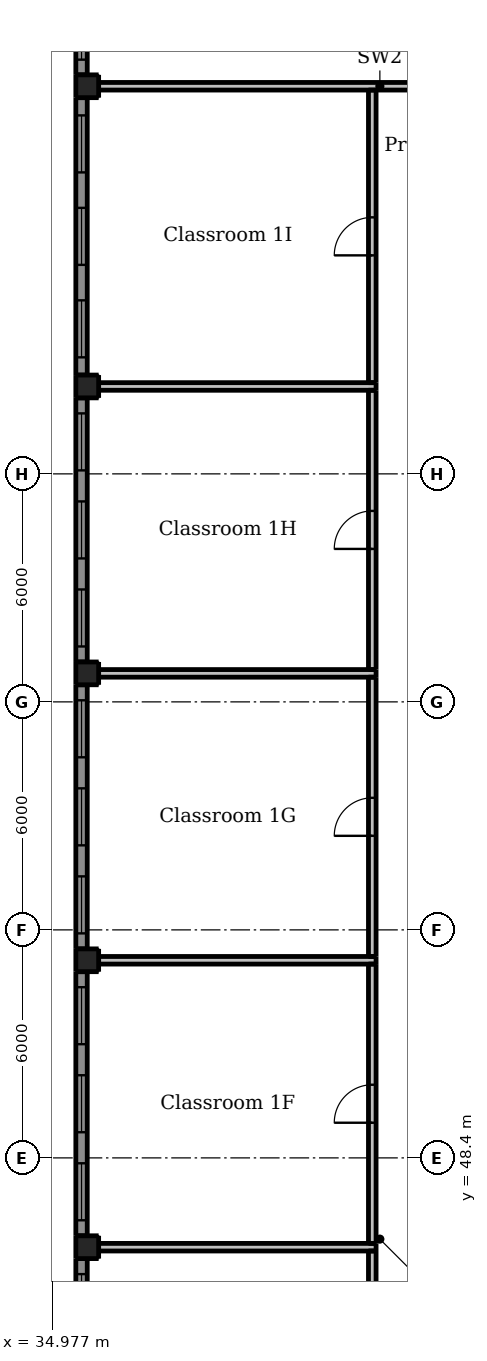
"""IFC4 building model, lengths in metres.
Left out: names, types, materials, properties, quantities, classifications, styles, units other than length and angle.
Written with IfcOpenShell. Run it as: python <this file> out.ifc"""

import sys

from ifc_helpers import new_model, si_unit, direction, frame, frame_2d, origin, origin_2d, place, context, subcontext, project, spatial, rectangle, extrude, element, fill, save


model = new_model("IFC4")
c1 = context("Model", 3, precision=1e-05, world=origin(), true_north=direction((0.0, 1.0)))
c2 = subcontext(c1, "Body", "Model", "MODEL_VIEW")
j1 = project(units=[si_unit("LENGTHUNIT", "METRE"), si_unit("PLANEANGLEUNIT", "RADIAN")], contexts=[c1])
p1 = place(None, origin())
s1 = spatial("IfcSite", under=j1, at=p1, CompositionType="ELEMENT")
p2 = place(p1, origin())
s2 = spatial("IfcBuilding", under=s1, at=p2, CompositionType="ELEMENT")
p3 = place(p2, frame((0.0, 0.0, 5.5)))
s3 = spatial("IfcBuildingStorey", under=s2, at=p3, CompositionType="ELEMENT", Elevation=5.5)
for number, where, z_axis, x_axis in (
    (1, (35.9, 46.05, -0.3), (0.0, 0.0, 1.0), (1.0, 0.0, 0.0)),
    (2, (35.9, 53.6, -0.3), (0.0, 0.0, 1.0), (1.0, 0.0, 0.0)),
    (3, (35.9, 61.15, -0.3), (0.0, 0.0, 1.0), (1.0, 0.0, 0.0)),
    (4, (35.9, 68.7, -0.3), (0.0, 0.0, 1.0), (1.0, 0.0, 0.0)),
    (5, (35.9, 76.6, -0.3), (0.0, 0.0, 1.0), (1.0, 0.0, 0.0)),
):
    element("IfcColumn", number, at=place(p3, frame(where, z_axis=z_axis, x_axis=x_axis)), inside=s3, PredefinedType="COLUMN", context=c2, shape_type="SweptSolid", body=[
        extrude(rectangle(XDim=0.6, YDim=0.6, at=origin_2d()), origin(), (0.0, 0.0, 1.0), 4.5),
    ])
p4 = place(p3, frame((35.75, 38.8, 0.0), z_axis=(0.0, 0.0, 1.0), x_axis=(0.0, 1.0, 0.0)))
e6 = element("IfcWall", 6, at=p4, inside=s3, PredefinedType="SOLIDWALL", context=c2, shape_type="SweptSolid", body=[
    extrude(rectangle(XDim=6.95, YDim=0.3, at=frame_2d((3.475, 0.0))), origin(), (0.0, 0.0, 1.0), 3.3),
])
p5 = place(p4, frame((0.408, 0.0, 0.9)))
e7 = element("IfcOpeningElement", 7, at=p5, cuts=e6, PredefinedType="OPENING", context=c2, shape_type="SweptSolid", body=[
    extrude(rectangle(XDim=1.5, YDim=1.5, at=frame_2d((0.75, 0.75))), frame((0.0, 0.16, 0.0), z_axis=(0.0, -1.0, 0.0), x_axis=(1.0, 0.0, 0.0)), (0.0, 0.0, 1.0), 0.32),
])
p6 = place(p4, frame((2.725, 0.0, 0.9)))
e8 = element("IfcOpeningElement", 8, at=p6, cuts=e6, PredefinedType="OPENING", context=c2, shape_type="SweptSolid", body=[
    extrude(rectangle(XDim=1.5, YDim=1.5, at=frame_2d((0.75, 0.75))), frame((0.0, 0.16, 0.0), z_axis=(0.0, -1.0, 0.0), x_axis=(1.0, 0.0, 0.0)), (0.0, 0.0, 1.0), 0.32),
])
p7 = place(p4, frame((5.042, 0.0, 0.9)))
e9 = element("IfcOpeningElement", 9, at=p7, cuts=e6, PredefinedType="OPENING", context=c2, shape_type="SweptSolid", body=[
    extrude(rectangle(XDim=1.5, YDim=1.5, at=frame_2d((0.75, 0.75))), frame((0.0, 0.16, 0.0), z_axis=(0.0, -1.0, 0.0), x_axis=(1.0, 0.0, 0.0)), (0.0, 0.0, 1.0), 0.32),
])
p8 = place(p3, frame((35.75, 46.35, 0.0), z_axis=(0.0, 0.0, 1.0), x_axis=(0.0, 1.0, 0.0)))
e10 = element("IfcWall", 10, at=p8, inside=s3, PredefinedType="SOLIDWALL", context=c2, shape_type="SweptSolid", body=[
    extrude(rectangle(XDim=6.95, YDim=0.3, at=frame_2d((3.475, 0.0))), origin(), (0.0, 0.0, 1.0), 3.3),
])
p9 = place(p8, frame((0.408, 0.0, 0.9)))
e11 = element("IfcOpeningElement", 11, at=p9, cuts=e10, PredefinedType="OPENING", context=c2, shape_type="SweptSolid", body=[
    extrude(rectangle(XDim=1.5, YDim=1.5, at=frame_2d((0.75, 0.75))), frame((0.0, 0.16, 0.0), z_axis=(0.0, -1.0, 0.0), x_axis=(1.0, 0.0, 0.0)), (0.0, 0.0, 1.0), 0.32),
])
p10 = place(p8, frame((2.725, 0.0, 0.9)))
e12 = element("IfcOpeningElement", 12, at=p10, cuts=e10, PredefinedType="OPENING", context=c2, shape_type="SweptSolid", body=[
    extrude(rectangle(XDim=1.5, YDim=1.5, at=frame_2d((0.75, 0.75))), frame((0.0, 0.16, 0.0), z_axis=(0.0, -1.0, 0.0), x_axis=(1.0, 0.0, 0.0)), (0.0, 0.0, 1.0), 0.32),
])
p11 = place(p8, frame((5.042, 0.0, 0.9)))
e13 = element("IfcOpeningElement", 13, at=p11, cuts=e10, PredefinedType="OPENING", context=c2, shape_type="SweptSolid", body=[
    extrude(rectangle(XDim=1.5, YDim=1.5, at=frame_2d((0.75, 0.75))), frame((0.0, 0.16, 0.0), z_axis=(0.0, -1.0, 0.0), x_axis=(1.0, 0.0, 0.0)), (0.0, 0.0, 1.0), 0.32),
])
p12 = place(p3, frame((35.75, 53.9, 0.0), z_axis=(0.0, 0.0, 1.0), x_axis=(0.0, 1.0, 0.0)))
e14 = element("IfcWall", 14, at=p12, inside=s3, PredefinedType="SOLIDWALL", context=c2, shape_type="SweptSolid", body=[
    extrude(rectangle(XDim=6.95, YDim=0.3, at=frame_2d((3.475, 0.0))), origin(), (0.0, 0.0, 1.0), 3.3),
])
p13 = place(p12, frame((0.408, 0.0, 0.9)))
e15 = element("IfcOpeningElement", 15, at=p13, cuts=e14, PredefinedType="OPENING", context=c2, shape_type="SweptSolid", body=[
    extrude(rectangle(XDim=1.5, YDim=1.5, at=frame_2d((0.75, 0.75))), frame((0.0, 0.16, 0.0), z_axis=(0.0, -1.0, 0.0), x_axis=(1.0, 0.0, 0.0)), (0.0, 0.0, 1.0), 0.32),
])
p14 = place(p12, frame((2.725, 0.0, 0.9)))
e16 = element("IfcOpeningElement", 16, at=p14, cuts=e14, PredefinedType="OPENING", context=c2, shape_type="SweptSolid", body=[
    extrude(rectangle(XDim=1.5, YDim=1.5, at=frame_2d((0.75, 0.75))), frame((0.0, 0.16, 0.0), z_axis=(0.0, -1.0, 0.0), x_axis=(1.0, 0.0, 0.0)), (0.0, 0.0, 1.0), 0.32),
])
p15 = place(p12, frame((5.042, 0.0, 0.9)))
e17 = element("IfcOpeningElement", 17, at=p15, cuts=e14, PredefinedType="OPENING", context=c2, shape_type="SweptSolid", body=[
    extrude(rectangle(XDim=1.5, YDim=1.5, at=frame_2d((0.75, 0.75))), frame((0.0, 0.16, 0.0), z_axis=(0.0, -1.0, 0.0), x_axis=(1.0, 0.0, 0.0)), (0.0, 0.0, 1.0), 0.32),
])
p16 = place(p3, frame((35.75, 61.45, 0.0), z_axis=(0.0, 0.0, 1.0), x_axis=(0.0, 1.0, 0.0)))
e18 = element("IfcWall", 18, at=p16, inside=s3, PredefinedType="SOLIDWALL", context=c2, shape_type="SweptSolid", body=[
    extrude(rectangle(XDim=6.95, YDim=0.3, at=frame_2d((3.475, 0.0))), origin(), (0.0, 0.0, 1.0), 3.3),
])
p17 = place(p16, frame((0.408, 0.0, 0.9)))
e19 = element("IfcOpeningElement", 19, at=p17, cuts=e18, PredefinedType="OPENING", context=c2, shape_type="SweptSolid", body=[
    extrude(rectangle(XDim=1.5, YDim=1.5, at=frame_2d((0.75, 0.75))), frame((0.0, 0.16, 0.0), z_axis=(0.0, -1.0, 0.0), x_axis=(1.0, 0.0, 0.0)), (0.0, 0.0, 1.0), 0.32),
])
p18 = place(p16, frame((2.725, 0.0, 0.9)))
e20 = element("IfcOpeningElement", 20, at=p18, cuts=e18, PredefinedType="OPENING", context=c2, shape_type="SweptSolid", body=[
    extrude(rectangle(XDim=1.5, YDim=1.5, at=frame_2d((0.75, 0.75))), frame((0.0, 0.16, 0.0), z_axis=(0.0, -1.0, 0.0), x_axis=(1.0, 0.0, 0.0)), (0.0, 0.0, 1.0), 0.32),
])
p19 = place(p16, frame((5.042, 0.0, 0.9)))
e21 = element("IfcOpeningElement", 21, at=p19, cuts=e18, PredefinedType="OPENING", context=c2, shape_type="SweptSolid", body=[
    extrude(rectangle(XDim=1.5, YDim=1.5, at=frame_2d((0.75, 0.75))), frame((0.0, 0.16, 0.0), z_axis=(0.0, -1.0, 0.0), x_axis=(1.0, 0.0, 0.0)), (0.0, 0.0, 1.0), 0.32),
])
p20 = place(p3, frame((35.75, 69.0, 0.0), z_axis=(0.0, 0.0, 1.0), x_axis=(0.0, 1.0, 0.0)))
e22 = element("IfcWall", 22, at=p20, inside=s3, PredefinedType="SOLIDWALL", context=c2, shape_type="SweptSolid", body=[
    extrude(rectangle(XDim=7.3, YDim=0.3, at=frame_2d((3.65, 0.0))), origin(), (0.0, 0.0, 1.0), 3.3),
])
p21 = place(p20, frame((0.467, 0.0, 0.9)))
e23 = element("IfcOpeningElement", 23, at=p21, cuts=e22, PredefinedType="OPENING", context=c2, shape_type="SweptSolid", body=[
    extrude(rectangle(XDim=1.5, YDim=1.5, at=frame_2d((0.75, 0.75))), frame((0.0, 0.16, 0.0), z_axis=(0.0, -1.0, 0.0), x_axis=(1.0, 0.0, 0.0)), (0.0, 0.0, 1.0), 0.32),
])
p22 = place(p20, frame((2.9, 0.0, 0.9)))
e24 = element("IfcOpeningElement", 24, at=p22, cuts=e22, PredefinedType="OPENING", context=c2, shape_type="SweptSolid", body=[
    extrude(rectangle(XDim=1.5, YDim=1.5, at=frame_2d((0.75, 0.75))), frame((0.0, 0.16, 0.0), z_axis=(0.0, -1.0, 0.0), x_axis=(1.0, 0.0, 0.0)), (0.0, 0.0, 1.0), 0.32),
])
p23 = place(p20, frame((5.333, 0.0, 0.9)))
e25 = element("IfcOpeningElement", 25, at=p23, cuts=e22, PredefinedType="OPENING", context=c2, shape_type="SweptSolid", body=[
    extrude(rectangle(XDim=1.5, YDim=1.5, at=frame_2d((0.75, 0.75))), frame((0.0, 0.16, 0.0), z_axis=(0.0, -1.0, 0.0), x_axis=(1.0, 0.0, 0.0)), (0.0, 0.0, 1.0), 0.32),
])
p24 = place(p3, frame((35.75, 76.9, 0.0), z_axis=(0.0, 0.0, 1.0), x_axis=(0.0, 1.0, 0.0)))
e26 = element("IfcWall", 26, at=p24, inside=s3, PredefinedType="SOLIDWALL", context=c2, shape_type="SweptSolid", body=[
    extrude(rectangle(XDim=6.9, YDim=0.3, at=frame_2d((3.45, 0.0))), origin(), (0.0, 0.0, 1.0), 3.3),
])
p25 = place(p24, frame((0.4, 0.0, 0.9)))
e27 = element("IfcOpeningElement", 27, at=p25, cuts=e26, PredefinedType="OPENING", context=c2, shape_type="SweptSolid", body=[
    extrude(rectangle(XDim=1.5, YDim=1.5, at=frame_2d((0.75, 0.75))), frame((0.0, 0.16, 0.0), z_axis=(0.0, -1.0, 0.0), x_axis=(1.0, 0.0, 0.0)), (0.0, 0.0, 1.0), 0.32),
])
p26 = place(p24, frame((2.7, 0.0, 0.9)))
e28 = element("IfcOpeningElement", 28, at=p26, cuts=e26, PredefinedType="OPENING", context=c2, shape_type="SweptSolid", body=[
    extrude(rectangle(XDim=1.5, YDim=1.5, at=frame_2d((0.75, 0.75))), frame((0.0, 0.16, 0.0), z_axis=(0.0, -1.0, 0.0), x_axis=(1.0, 0.0, 0.0)), (0.0, 0.0, 1.0), 0.32),
])
p27 = place(p24, frame((5.0, 0.0, 0.9)))
e29 = element("IfcOpeningElement", 29, at=p27, cuts=e26, PredefinedType="OPENING", context=c2, shape_type="SweptSolid", body=[
    extrude(rectangle(XDim=1.5, YDim=1.5, at=frame_2d((0.75, 0.75))), frame((0.0, 0.16, 0.0), z_axis=(0.0, -1.0, 0.0), x_axis=(1.0, 0.0, 0.0)), (0.0, 0.0, 1.0), 0.32),
])
p28 = place(p3, frame((43.4, 38.6, 0.0), z_axis=(0.0, 0.0, 1.0), x_axis=(0.0, 1.0, 0.0)))
e30 = element("IfcWall", 30, at=p28, inside=s3, PredefinedType="PARTITIONING", context=c2, shape_type="SweptSolid", body=[
    extrude(rectangle(XDim=7.35, YDim=0.2, at=frame_2d((3.675, 0.0))), origin(), (0.0, 0.0, 1.0), 3.1),
])
p29 = place(p28, frame((3.175, 0.0, 0.0)))
e31 = element("IfcOpeningElement", 31, at=p29, cuts=e30, PredefinedType="OPENING", context=c2, shape_type="SweptSolid", body=[
    extrude(rectangle(XDim=1.0, YDim=2.1, at=frame_2d((0.5, 1.05))), frame((0.0, 0.11, 0.0), z_axis=(0.0, -1.0, 0.0), x_axis=(1.0, 0.0, 0.0)), (0.0, 0.0, 1.0), 0.22),
])
p30 = place(p3, frame((43.4, 46.15, 0.0), z_axis=(0.0, 0.0, 1.0), x_axis=(0.0, 1.0, 0.0)))
e32 = element("IfcWall", 32, at=p30, inside=s3, PredefinedType="PARTITIONING", context=c2, shape_type="SweptSolid", body=[
    extrude(rectangle(XDim=7.35, YDim=0.2, at=frame_2d((3.675, 0.0))), origin(), (0.0, 0.0, 1.0), 3.1),
])
p31 = place(p30, frame((3.175, 0.0, 0.0)))
e33 = element("IfcOpeningElement", 33, at=p31, cuts=e32, PredefinedType="OPENING", context=c2, shape_type="SweptSolid", body=[
    extrude(rectangle(XDim=1.0, YDim=2.1, at=frame_2d((0.5, 1.05))), frame((0.0, 0.11, 0.0), z_axis=(0.0, -1.0, 0.0), x_axis=(1.0, 0.0, 0.0)), (0.0, 0.0, 1.0), 0.22),
])
p32 = place(p3, frame((43.4, 53.7, 0.0), z_axis=(0.0, 0.0, 1.0), x_axis=(0.0, 1.0, 0.0)))
e34 = element("IfcWall", 34, at=p32, inside=s3, PredefinedType="PARTITIONING", context=c2, shape_type="SweptSolid", body=[
    extrude(rectangle(XDim=7.35, YDim=0.2, at=frame_2d((3.675, 0.0))), origin(), (0.0, 0.0, 1.0), 3.1),
])
p33 = place(p32, frame((3.175, 0.0, 0.0)))
e35 = element("IfcOpeningElement", 35, at=p33, cuts=e34, PredefinedType="OPENING", context=c2, shape_type="SweptSolid", body=[
    extrude(rectangle(XDim=1.0, YDim=2.1, at=frame_2d((0.5, 1.05))), frame((0.0, 0.11, 0.0), z_axis=(0.0, -1.0, 0.0), x_axis=(1.0, 0.0, 0.0)), (0.0, 0.0, 1.0), 0.22),
])
p34 = place(p3, frame((43.4, 61.25, 0.0), z_axis=(0.0, 0.0, 1.0), x_axis=(0.0, 1.0, 0.0)))
e36 = element("IfcWall", 36, at=p34, inside=s3, PredefinedType="PARTITIONING", context=c2, shape_type="SweptSolid", body=[
    extrude(rectangle(XDim=7.35, YDim=0.2, at=frame_2d((3.675, 0.0))), origin(), (0.0, 0.0, 1.0), 3.1),
])
p35 = place(p34, frame((3.175, 0.0, 0.0)))
e37 = element("IfcOpeningElement", 37, at=p35, cuts=e36, PredefinedType="OPENING", context=c2, shape_type="SweptSolid", body=[
    extrude(rectangle(XDim=1.0, YDim=2.1, at=frame_2d((0.5, 1.05))), frame((0.0, 0.11, 0.0), z_axis=(0.0, -1.0, 0.0), x_axis=(1.0, 0.0, 0.0)), (0.0, 0.0, 1.0), 0.22),
])
p36 = place(p3, frame((43.4, 68.8, 0.0), z_axis=(0.0, 0.0, 1.0), x_axis=(0.0, 1.0, 0.0)))
e38 = element("IfcWall", 38, at=p36, inside=s3, PredefinedType="PARTITIONING", context=c2, shape_type="SweptSolid", body=[
    extrude(rectangle(XDim=7.7, YDim=0.2, at=frame_2d((3.85, 0.0))), origin(), (0.0, 0.0, 1.0), 3.1),
])
p37 = place(p36, frame((3.35, 0.0, 0.0)))
e39 = element("IfcOpeningElement", 39, at=p37, cuts=e38, PredefinedType="OPENING", context=c2, shape_type="SweptSolid", body=[
    extrude(rectangle(XDim=1.0, YDim=2.1, at=frame_2d((0.5, 1.05))), frame((0.0, 0.11, 0.0), z_axis=(0.0, -1.0, 0.0), x_axis=(1.0, 0.0, 0.0)), (0.0, 0.0, 1.0), 0.22),
])
for number, where, z_axis, x_axis in (
    (40, (36.2, 46.05, 0.0), (0.0, 0.0, 1.0), (1.0, 0.0, 0.0)),
    (41, (36.2, 53.6, 0.0), (0.0, 0.0, 1.0), (1.0, 0.0, 0.0)),
    (42, (36.2, 61.15, 0.0), (0.0, 0.0, 1.0), (1.0, 0.0, 0.0)),
    (43, (36.2, 68.7, 0.0), (0.0, 0.0, 1.0), (1.0, 0.0, 0.0)),
):
    element("IfcWall", number, at=place(p3, frame(where, z_axis=z_axis, x_axis=x_axis)), inside=s3, PredefinedType="PARTITIONING", context=c2, shape_type="SweptSolid", body=[
        extrude(rectangle(XDim=7.3, YDim=0.2, at=frame_2d((3.65, 0.0))), origin(), (0.0, 0.0, 1.0), 3.1),
    ])
p38 = place(p3, frame((36.2, 76.6, 0.0), z_axis=(0.0, 0.0, 1.0), x_axis=(1.0, 0.0, 0.0)))
e44 = element("IfcWall", 44, at=p38, inside=s3, PredefinedType="PARTITIONING", context=c2, shape_type="SweptSolid", body=[
    extrude(rectangle(XDim=14.8, YDim=0.2, at=frame_2d((7.4, 0.0))), origin(), (0.0, 0.0, 1.0), 3.1),
])
p39 = place(p38, frame((11.1, 0.0, 0.0)))
e45 = element("IfcOpeningElement", 45, at=p39, cuts=e44, PredefinedType="OPENING", context=c2, shape_type="SweptSolid", body=[
    extrude(rectangle(XDim=1.0, YDim=2.1, at=frame_2d((0.5, 1.05))), frame((0.0, 0.11, 0.0), z_axis=(0.0, -1.0, 0.0), x_axis=(1.0, 0.0, 0.0)), (0.0, 0.0, 1.0), 0.22),
])
p40 = place(p7, origin())
e46 = element("IfcWindow", 46, at=p40, inside=s3, PartitioningType="DOUBLE_PANEL_HORIZONTAL", PredefinedType="WINDOW", context=c2, shape_type="SweptSolid", body=[
    extrude(rectangle(XDim=1.5, YDim=1.5, at=frame_2d((0.75, 0.75))), frame((0.0, 0.03, 0.0), z_axis=(0.0, -1.0, 0.0), x_axis=(1.0, 0.0, 0.0)), (0.0, 0.0, 1.0), 0.06),
])
fill(e9, e46)
p41 = place(p9, origin())
e47 = element("IfcWindow", 47, at=p41, inside=s3, PartitioningType="DOUBLE_PANEL_HORIZONTAL", PredefinedType="WINDOW", context=c2, shape_type="SweptSolid", body=[
    extrude(rectangle(XDim=1.5, YDim=1.5, at=frame_2d((0.75, 0.75))), frame((0.0, 0.03, 0.0), z_axis=(0.0, -1.0, 0.0), x_axis=(1.0, 0.0, 0.0)), (0.0, 0.0, 1.0), 0.06),
])
fill(e11, e47)
p42 = place(p10, origin())
e48 = element("IfcWindow", 48, at=p42, inside=s3, PartitioningType="DOUBLE_PANEL_HORIZONTAL", PredefinedType="WINDOW", context=c2, shape_type="SweptSolid", body=[
    extrude(rectangle(XDim=1.5, YDim=1.5, at=frame_2d((0.75, 0.75))), frame((0.0, 0.03, 0.0), z_axis=(0.0, -1.0, 0.0), x_axis=(1.0, 0.0, 0.0)), (0.0, 0.0, 1.0), 0.06),
])
fill(e12, e48)
p43 = place(p11, origin())
e49 = element("IfcWindow", 49, at=p43, inside=s3, PartitioningType="DOUBLE_PANEL_HORIZONTAL", PredefinedType="WINDOW", context=c2, shape_type="SweptSolid", body=[
    extrude(rectangle(XDim=1.5, YDim=1.5, at=frame_2d((0.75, 0.75))), frame((0.0, 0.03, 0.0), z_axis=(0.0, -1.0, 0.0), x_axis=(1.0, 0.0, 0.0)), (0.0, 0.0, 1.0), 0.06),
])
fill(e13, e49)
p44 = place(p13, origin())
e50 = element("IfcWindow", 50, at=p44, inside=s3, PartitioningType="DOUBLE_PANEL_HORIZONTAL", PredefinedType="WINDOW", context=c2, shape_type="SweptSolid", body=[
    extrude(rectangle(XDim=1.5, YDim=1.5, at=frame_2d((0.75, 0.75))), frame((0.0, 0.03, 0.0), z_axis=(0.0, -1.0, 0.0), x_axis=(1.0, 0.0, 0.0)), (0.0, 0.0, 1.0), 0.06),
])
fill(e15, e50)
p45 = place(p14, origin())
e51 = element("IfcWindow", 51, at=p45, inside=s3, PartitioningType="DOUBLE_PANEL_HORIZONTAL", PredefinedType="WINDOW", context=c2, shape_type="SweptSolid", body=[
    extrude(rectangle(XDim=1.5, YDim=1.5, at=frame_2d((0.75, 0.75))), frame((0.0, 0.03, 0.0), z_axis=(0.0, -1.0, 0.0), x_axis=(1.0, 0.0, 0.0)), (0.0, 0.0, 1.0), 0.06),
])
fill(e16, e51)
p46 = place(p15, origin())
e52 = element("IfcWindow", 52, at=p46, inside=s3, PartitioningType="DOUBLE_PANEL_HORIZONTAL", PredefinedType="WINDOW", context=c2, shape_type="SweptSolid", body=[
    extrude(rectangle(XDim=1.5, YDim=1.5, at=frame_2d((0.75, 0.75))), frame((0.0, 0.03, 0.0), z_axis=(0.0, -1.0, 0.0), x_axis=(1.0, 0.0, 0.0)), (0.0, 0.0, 1.0), 0.06),
])
fill(e17, e52)
p47 = place(p17, origin())
e53 = element("IfcWindow", 53, at=p47, inside=s3, PartitioningType="DOUBLE_PANEL_HORIZONTAL", PredefinedType="WINDOW", context=c2, shape_type="SweptSolid", body=[
    extrude(rectangle(XDim=1.5, YDim=1.5, at=frame_2d((0.75, 0.75))), frame((0.0, 0.03, 0.0), z_axis=(0.0, -1.0, 0.0), x_axis=(1.0, 0.0, 0.0)), (0.0, 0.0, 1.0), 0.06),
])
fill(e19, e53)
p48 = place(p18, origin())
e54 = element("IfcWindow", 54, at=p48, inside=s3, PartitioningType="DOUBLE_PANEL_HORIZONTAL", PredefinedType="WINDOW", context=c2, shape_type="SweptSolid", body=[
    extrude(rectangle(XDim=1.5, YDim=1.5, at=frame_2d((0.75, 0.75))), frame((0.0, 0.03, 0.0), z_axis=(0.0, -1.0, 0.0), x_axis=(1.0, 0.0, 0.0)), (0.0, 0.0, 1.0), 0.06),
])
fill(e20, e54)
p49 = place(p19, origin())
e55 = element("IfcWindow", 55, at=p49, inside=s3, PartitioningType="DOUBLE_PANEL_HORIZONTAL", PredefinedType="WINDOW", context=c2, shape_type="SweptSolid", body=[
    extrude(rectangle(XDim=1.5, YDim=1.5, at=frame_2d((0.75, 0.75))), frame((0.0, 0.03, 0.0), z_axis=(0.0, -1.0, 0.0), x_axis=(1.0, 0.0, 0.0)), (0.0, 0.0, 1.0), 0.06),
])
fill(e21, e55)
p50 = place(p21, origin())
e56 = element("IfcWindow", 56, at=p50, inside=s3, PartitioningType="DOUBLE_PANEL_HORIZONTAL", PredefinedType="WINDOW", context=c2, shape_type="SweptSolid", body=[
    extrude(rectangle(XDim=1.5, YDim=1.5, at=frame_2d((0.75, 0.75))), frame((0.0, 0.03, 0.0), z_axis=(0.0, -1.0, 0.0), x_axis=(1.0, 0.0, 0.0)), (0.0, 0.0, 1.0), 0.06),
])
fill(e23, e56)
p51 = place(p22, origin())
e57 = element("IfcWindow", 57, at=p51, inside=s3, PartitioningType="DOUBLE_PANEL_HORIZONTAL", PredefinedType="WINDOW", context=c2, shape_type="SweptSolid", body=[
    extrude(rectangle(XDim=1.5, YDim=1.5, at=frame_2d((0.75, 0.75))), frame((0.0, 0.03, 0.0), z_axis=(0.0, -1.0, 0.0), x_axis=(1.0, 0.0, 0.0)), (0.0, 0.0, 1.0), 0.06),
])
fill(e24, e57)
p52 = place(p23, origin())
e58 = element("IfcWindow", 58, at=p52, inside=s3, PartitioningType="DOUBLE_PANEL_HORIZONTAL", PredefinedType="WINDOW", context=c2, shape_type="SweptSolid", body=[
    extrude(rectangle(XDim=1.5, YDim=1.5, at=frame_2d((0.75, 0.75))), frame((0.0, 0.03, 0.0), z_axis=(0.0, -1.0, 0.0), x_axis=(1.0, 0.0, 0.0)), (0.0, 0.0, 1.0), 0.06),
])
fill(e25, e58)
p53 = place(p25, origin())
e59 = element("IfcWindow", 59, at=p53, inside=s3, PartitioningType="DOUBLE_PANEL_HORIZONTAL", PredefinedType="WINDOW", context=c2, shape_type="SweptSolid", body=[
    extrude(rectangle(XDim=1.5, YDim=1.5, at=frame_2d((0.75, 0.75))), frame((0.0, 0.03, 0.0), z_axis=(0.0, -1.0, 0.0), x_axis=(1.0, 0.0, 0.0)), (0.0, 0.0, 1.0), 0.06),
])
fill(e27, e59)
p54 = place(p31, origin())
e60 = element("IfcDoor", 60, at=p54, inside=s3, OperationType="SINGLE_SWING_LEFT", PredefinedType="DOOR", context=c2, shape_type="SweptSolid", body=[
    extrude(rectangle(XDim=1.0, YDim=2.1, at=frame_2d((0.5, 1.05))), frame((0.0, 0.025, 0.0), z_axis=(0.0, -1.0, 0.0), x_axis=(1.0, 0.0, 0.0)), (0.0, 0.0, 1.0), 0.05),
])
fill(e33, e60)
p55 = place(p33, origin())
e61 = element("IfcDoor", 61, at=p55, inside=s3, OperationType="SINGLE_SWING_LEFT", PredefinedType="DOOR", context=c2, shape_type="SweptSolid", body=[
    extrude(rectangle(XDim=1.0, YDim=2.1, at=frame_2d((0.5, 1.05))), frame((0.0, 0.025, 0.0), z_axis=(0.0, -1.0, 0.0), x_axis=(1.0, 0.0, 0.0)), (0.0, 0.0, 1.0), 0.05),
])
fill(e35, e61)
p56 = place(p35, origin())
e62 = element("IfcDoor", 62, at=p56, inside=s3, OperationType="SINGLE_SWING_LEFT", PredefinedType="DOOR", context=c2, shape_type="SweptSolid", body=[
    extrude(rectangle(XDim=1.0, YDim=2.1, at=frame_2d((0.5, 1.05))), frame((0.0, 0.025, 0.0), z_axis=(0.0, -1.0, 0.0), x_axis=(1.0, 0.0, 0.0)), (0.0, 0.0, 1.0), 0.05),
])
fill(e37, e62)
p57 = place(p37, origin())
e63 = element("IfcDoor", 63, at=p57, inside=s3, OperationType="SINGLE_SWING_LEFT", PredefinedType="DOOR", context=c2, shape_type="SweptSolid", body=[
    extrude(rectangle(XDim=1.0, YDim=2.1, at=frame_2d((0.5, 1.05))), frame((0.0, 0.025, 0.0), z_axis=(0.0, -1.0, 0.0), x_axis=(1.0, 0.0, 0.0)), (0.0, 0.0, 1.0), 0.05),
])
fill(e39, e63)
save(model, sys.argv[1])
